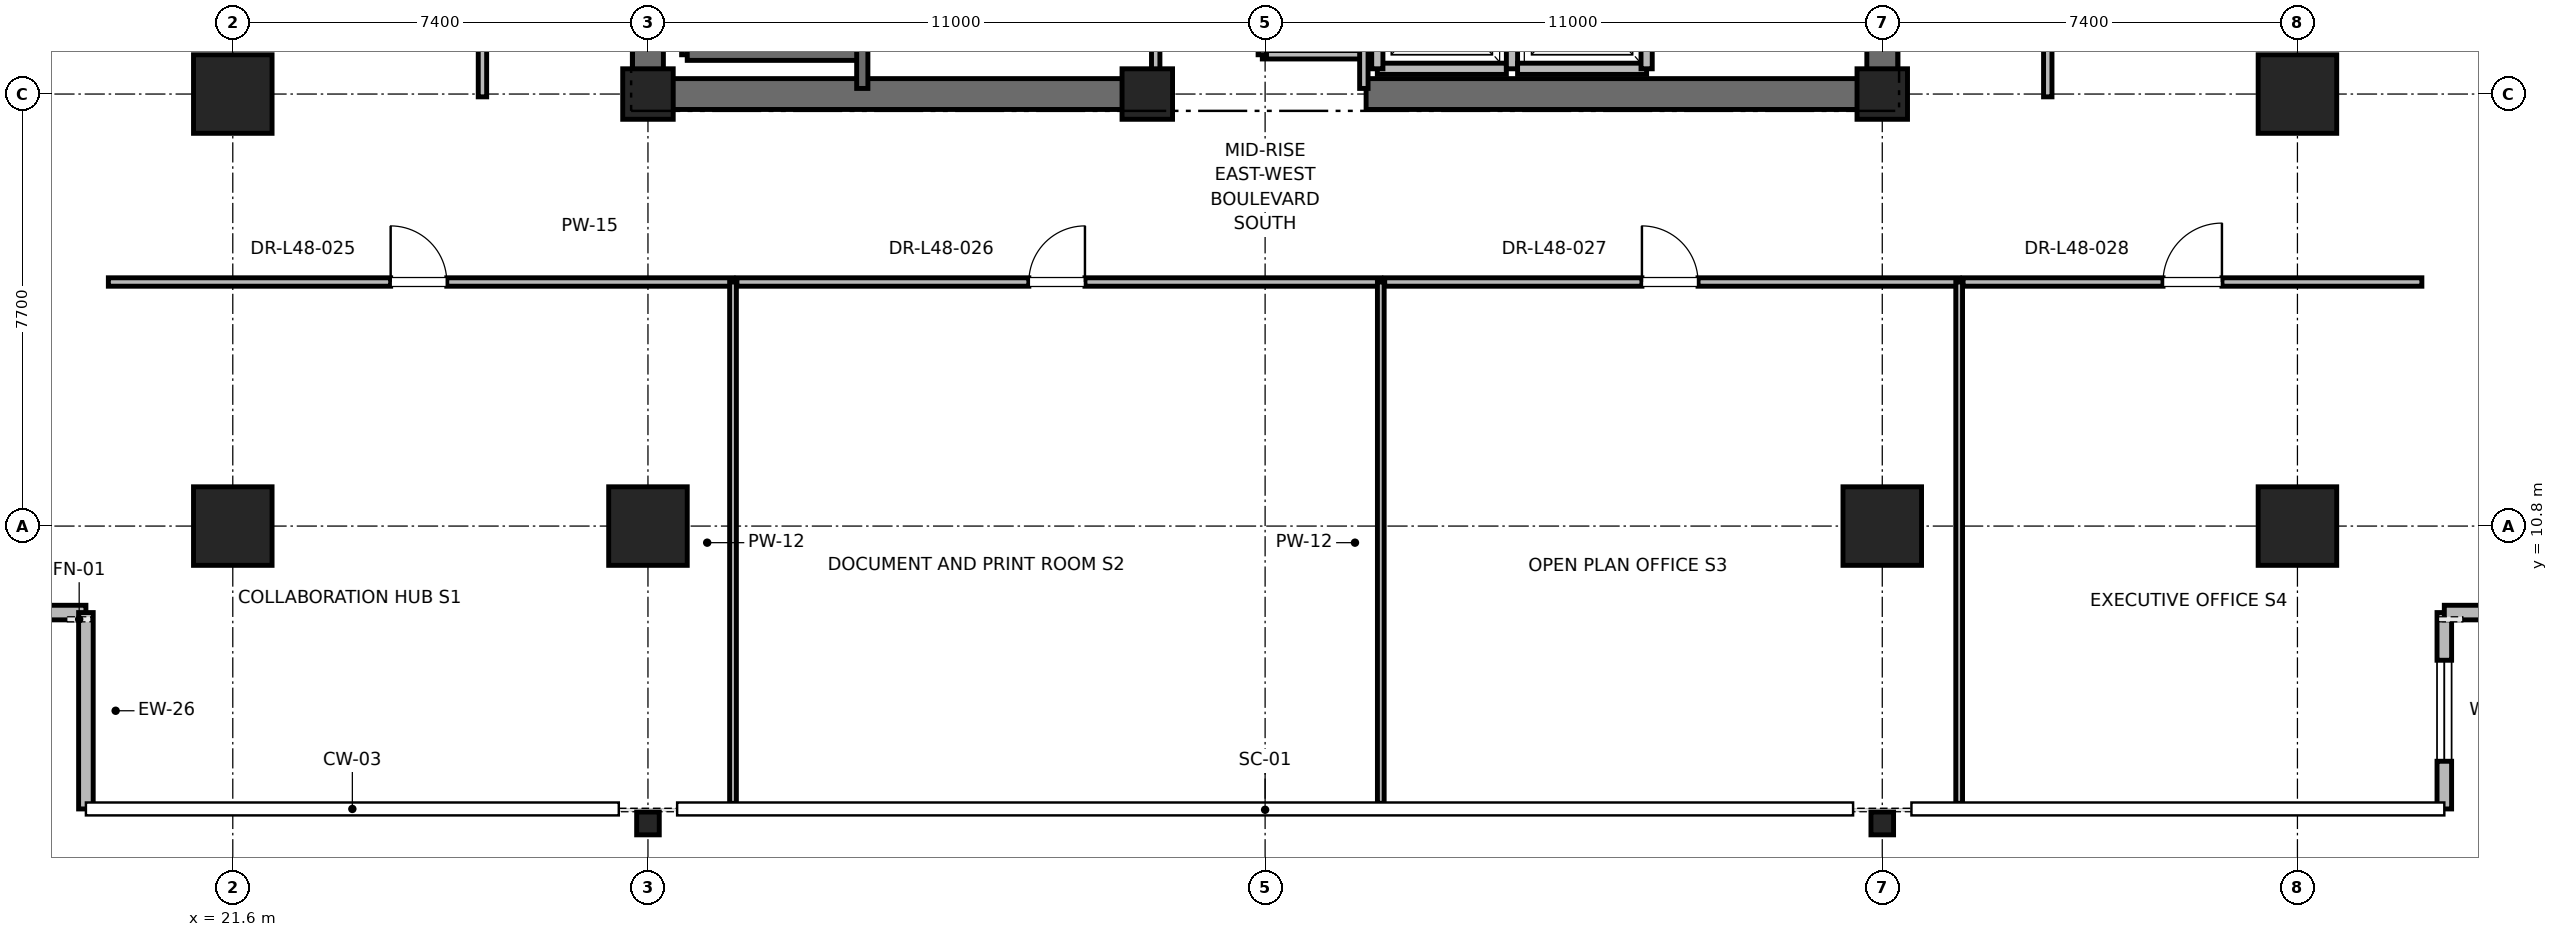
"""IFC4 building model, lengths in metres.
Left out: names, types, materials, properties, quantities, classifications, styles, units other than length and angle.
Written with IfcOpenShell. Run it as: python <this file> out.ifc"""

import sys

from ifc_helpers import new_model, si_unit, direction, frame, frame_2d, origin, origin_2d, place, context, subcontext, project, spatial, rectangle, i_section, extrude, element, fill, save


model = new_model("IFC4")
c1 = context("Model", 3, precision=1e-05, world=origin(), true_north=direction((0.0, 1.0)))
c2 = subcontext(c1, "Body", "Model", "MODEL_VIEW")
j1 = project(units=[si_unit("LENGTHUNIT", "METRE"), si_unit("PLANEANGLEUNIT", "RADIAN")], contexts=[c1])
p1 = place(None, origin())
s1 = spatial("IfcSite", under=j1, at=p1, CompositionType="ELEMENT")
p2 = place(p1, origin())
s2 = spatial("IfcBuilding", under=s1, at=p2, CompositionType="ELEMENT")
p3 = place(p2, frame((0.0, 0.0, 209.2)))
s3 = spatial("IfcBuildingStorey", under=s2, at=p3, CompositionType="ELEMENT", Elevation=209.2)
for number, where, z_axis, x_axis in (
    (1, (29.0, 10.8, 0.0), (0.0, 0.0, 1.0), (1.0, 0.0, 0.0)),
    (2, (51.0, 10.8, 0.0), (0.0, 0.0, 1.0), (1.0, 0.0, 0.0)),
    (3, (21.6, 18.5, 0.0), (0.0, 0.0, 1.0), (1.0, 0.0, 0.0)),
    (4, (58.4, 18.5, 0.0), (0.0, 0.0, 1.0), (1.0, 0.0, 0.0)),
    (5, (21.6, 10.8, 0.0), (0.0, 0.0, 1.0), (1.0, 0.0, 0.0)),
    (6, (58.4, 10.8, 0.0), (0.0, 0.0, 1.0), (1.0, 0.0, 0.0)),
):
    element("IfcColumn", number, at=place(p3, frame(where, z_axis=z_axis, x_axis=x_axis)), inside=s3, PredefinedType="COLUMN", context=c2, shape_type="SweptSolid", body=[
        extrude(rectangle(XDim=1.4, YDim=1.4, at=origin_2d()), origin(), (0.0, 0.0, 1.0), 4.0),
    ])
for number, where, z_axis, x_axis in (
    (7, (29.0, 5.5, 0.0), (0.0, 0.0, 1.0), (1.0, 0.0, 0.0)),
    (8, (51.0, 5.5, 0.0), (0.0, 0.0, 1.0), (1.0, 0.0, 0.0)),
):
    element("IfcColumn", number, at=place(p3, frame(where, z_axis=z_axis, x_axis=x_axis)), inside=s3, PredefinedType="COLUMN", context=c2, shape_type="SweptSolid", body=[
        extrude(i_section(OverallWidth=0.403, OverallDepth=0.406, WebThickness=0.027, FlangeThickness=0.043, FilletRadius=0.015, at=origin_2d()), origin(), (0.0, 0.0, 1.0), 4.0),
    ])
for number, where, z_axis, x_axis in (
    (9, (29.0, 18.5, 0.0), (0.0, 0.0, 1.0), (1.0, 0.0, 0.0)),
    (10, (51.0, 18.5, 0.0), (0.0, 0.0, 1.0), (1.0, 0.0, 0.0)),
    (11, (37.9, 18.5, 0.0), (0.0, 0.0, 1.0), (1.0, 0.0, 0.0)),
):
    element("IfcColumn", number, at=place(p3, frame(where, z_axis=z_axis, x_axis=x_axis)), inside=s3, PredefinedType="PILASTER", context=c2, shape_type="SweptSolid", body=[
        extrude(rectangle(XDim=0.9, YDim=0.9, at=origin_2d()), origin(), (0.0, 0.0, 1.0), 4.0),
    ])
for number, where, z_axis, x_axis in (
    (12, (29.0, 18.5, 0.0), (0.0, 0.0, 1.0), (1.0, 0.0, 0.0)),
    (13, (41.8, 18.5, 0.0), (0.0, 0.0, 1.0), (1.0, 0.0, 0.0)),
):
    element("IfcWall", number, at=place(p3, frame(where, z_axis=z_axis, x_axis=x_axis)), inside=s3, PredefinedType="SHEAR", context=c2, shape_type="SweptSolid", body=[
        extrude(rectangle(XDim=9.2, YDim=0.55, at=frame_2d((4.6, 0.0))), origin(), (0.0, 0.0, 1.0), 3.775),
    ])
p4 = place(p3, frame((29.0, 18.5, 0.0), z_axis=(0.0, 0.0, 1.0), x_axis=(0.0, 1.0, 0.0)))
e14 = element("IfcWall", 14, at=p4, inside=s3, PredefinedType="SHEAR", context=c2, shape_type="SweptSolid", body=[
    extrude(rectangle(XDim=8.8, YDim=0.55, at=frame_2d((4.4, 0.0))), origin(), (0.0, 0.0, 1.0), 3.775),
])
p5 = place(p3, frame((51.0, 18.5, 0.0), z_axis=(0.0, 0.0, 1.0), x_axis=(0.0, 1.0, 0.0)))
e15 = element("IfcWall", 15, at=p5, inside=s3, PredefinedType="SHEAR", context=c2, shape_type="SweptSolid", body=[
    extrude(rectangle(XDim=5.8, YDim=0.55, at=frame_2d((2.9, 0.0))), origin(), (0.0, 0.0, 1.0), 3.775),
])
p6 = place(p3, frame((14.982, 9.258, 0.0), z_axis=(0.0, 0.0, 1.0), x_axis=(1.0, 0.0, 0.0)))
e16 = element("IfcWall", 16, at=p6, inside=s3, PredefinedType="PARAPET", context=c2, shape_type="SweptSolid", body=[
    extrude(rectangle(XDim=4.0, YDim=0.26, at=frame_2d((2.0, 0.0))), origin(), (0.0, 0.0, 1.0), 3.775),
])
p7 = place(p6, frame((1.1, 0.0, 0.85)))
e17 = element("IfcOpeningElement", 17, at=p7, cuts=e16, PredefinedType="OPENING", context=c2, shape_type="SweptSolid", body=[
    extrude(rectangle(XDim=1.8, YDim=2.2, at=frame_2d((0.9, 1.1))), frame((0.0, 0.13, 0.0), z_axis=(0.0, -1.0, 0.0), x_axis=(1.0, 0.0, 0.0)), (0.0, 0.0, 1.0), 0.26),
])
p8 = place(p3, frame((18.982, 9.258, 0.0), z_axis=(0.0, 0.0, 1.0), x_axis=(0.0, -1.0, 0.0)))
e18 = element("IfcWall", 18, at=p8, inside=s3, PredefinedType="PARAPET", context=c2, shape_type="SweptSolid", body=[
    extrude(rectangle(XDim=3.5, YDim=0.26, at=frame_2d((1.75, 0.0))), origin(), (0.0, 0.0, 1.0), 3.775),
])
p9 = place(p3, frame((61.018, 5.758, 0.0), z_axis=(0.0, 0.0, 1.0), x_axis=(0.0, 1.0, 0.0)))
e19 = element("IfcWall", 19, at=p9, inside=s3, PredefinedType="PARAPET", context=c2, shape_type="SweptSolid", body=[
    extrude(rectangle(XDim=3.5, YDim=0.26, at=frame_2d((1.75, 0.0))), origin(), (0.0, 0.0, 1.0), 3.775),
])
p10 = place(p9, frame((0.85, 0.0, 0.85)))
e20 = element("IfcOpeningElement", 20, at=p10, cuts=e19, PredefinedType="OPENING", context=c2, shape_type="SweptSolid", body=[
    extrude(rectangle(XDim=1.8, YDim=2.2, at=frame_2d((0.9, 1.1))), frame((0.0, 0.13, 0.0), z_axis=(0.0, -1.0, 0.0), x_axis=(1.0, 0.0, 0.0)), (0.0, 0.0, 1.0), 0.26),
])
p11 = place(p3, frame((61.018, 9.258, 0.0), z_axis=(0.0, 0.0, 1.0), x_axis=(1.0, 0.0, 0.0)))
e21 = element("IfcWall", 21, at=p11, inside=s3, PredefinedType="PARAPET", context=c2, shape_type="SweptSolid", body=[
    extrude(rectangle(XDim=4.0, YDim=0.26, at=frame_2d((2.0, 0.0))), origin(), (0.0, 0.0, 1.0), 3.775),
])
p12 = place(p3, frame((29.7, 19.2, 0.0), z_axis=(0.0, 0.0, 1.0), x_axis=(0.0, 1.0, 0.0)))
e22 = element("IfcWall", 22, at=p12, inside=s3, PredefinedType="SOLIDWALL", context=c2, shape_type="SweptSolid", body=[
    extrude(rectangle(XDim=8.15, YDim=0.2, at=frame_2d((4.075, 0.0))), origin(), (0.0, 0.0, 1.0), 3.775),
])
p13 = place(p3, frame((29.7, 19.2, 0.0), z_axis=(0.0, 0.0, 1.0), x_axis=(1.0, 0.0, 0.0)))
e23 = element("IfcWall", 23, at=p13, inside=s3, PredefinedType="SOLIDWALL", context=c2, shape_type="SweptSolid", body=[
    extrude(rectangle(XDim=3.12, YDim=0.2, at=frame_2d((1.56, 0.0))), origin(), (0.0, 0.0, 1.0), 3.775),
])
p14 = place(p3, frame((32.82, 18.6, 0.0), z_axis=(0.0, 0.0, 1.0), x_axis=(0.0, 1.0, 0.0)))
e24 = element("IfcWall", 24, at=p14, inside=s3, PredefinedType="SOLIDWALL", context=c2, shape_type="SweptSolid", body=[
    extrude(rectangle(XDim=8.78, YDim=0.2, at=frame_2d((4.39, 0.0))), origin(), (0.0, 0.0, 1.0), 3.775),
])
p15 = place(p3, frame((42.0, 18.95, 0.0), z_axis=(0.0, 0.0, 1.0), x_axis=(1.0, 0.0, 0.0)))
e25 = element("IfcWall", 25, at=p15, inside=s3, PredefinedType="SOLIDWALL", context=c2, shape_type="SweptSolid", body=[
    extrude(rectangle(XDim=2.3, YDim=0.2, at=frame_2d((1.15, 0.0))), origin(), (0.0, 0.0, 1.0), 2.755),
])
p16 = place(p3, frame((42.0, 21.55, 0.0), z_axis=(0.0, 0.0, 1.0), x_axis=(0.0, -1.0, 0.0)))
e26 = element("IfcWall", 26, at=p16, inside=s3, PredefinedType="SOLIDWALL", context=c2, shape_type="SweptSolid", body=[
    extrude(rectangle(XDim=2.6, YDim=0.2, at=frame_2d((1.3, 0.0))), origin(), (0.0, 0.0, 1.0), 2.755),
])
p17 = place(p3, frame((44.4, 18.95, 0.0), z_axis=(0.0, 0.0, 1.0), x_axis=(0.0, 1.0, 0.0)))
e27 = element("IfcWall", 27, at=p17, inside=s3, PredefinedType="SOLIDWALL", context=c2, shape_type="SweptSolid", body=[
    extrude(rectangle(XDim=2.6, YDim=0.2, at=frame_2d((1.3, 0.0))), origin(), (0.0, 0.0, 1.0), 3.775),
])
p18 = place(p3, frame((44.5, 18.95, 0.0), z_axis=(0.0, 0.0, 1.0), x_axis=(1.0, 0.0, 0.0)))
e28 = element("IfcWall", 28, at=p18, inside=s3, PredefinedType="SOLIDWALL", context=c2, shape_type="SweptSolid", body=[
    extrude(rectangle(XDim=2.3, YDim=0.2, at=frame_2d((1.15, 0.0))), origin(), (0.0, 0.0, 1.0), 3.775),
])
p19 = place(p3, frame((46.8, 18.95, 0.0), z_axis=(0.0, 0.0, 1.0), x_axis=(0.0, 1.0, 0.0)))
e29 = element("IfcWall", 29, at=p19, inside=s3, PredefinedType="SOLIDWALL", context=c2, shape_type="SweptSolid", body=[
    extrude(rectangle(XDim=2.6, YDim=0.2, at=frame_2d((1.3, 0.0))), origin(), (0.0, 0.0, 1.0), 3.775),
])
p20 = place(p3, frame((39.95, 19.2, 0.0), z_axis=(0.0, 0.0, 1.0), x_axis=(1.0, 0.0, 0.0)))
e30 = element("IfcWall", 30, at=p20, inside=s3, PredefinedType="PARTITIONING", context=c2, shape_type="SweptSolid", body=[
    extrude(rectangle(XDim=1.81, YDim=0.15, at=frame_2d((0.905, 0.0))), origin(), (0.0, 0.0, 1.0), 2.85),
])
p21 = place(p3, frame((41.76, 18.6, 0.0), z_axis=(0.0, 0.0, 1.0), x_axis=(0.0, 1.0, 0.0)))
e31 = element("IfcWall", 31, at=p21, inside=s3, PredefinedType="PARTITIONING", context=c2, shape_type="SweptSolid", body=[
    extrude(rectangle(XDim=3.6, YDim=0.15, at=frame_2d((1.8, 0.0))), origin(), (0.0, 0.0, 1.0), 2.755),
])
p22 = place(p3, frame((39.95, 19.2, 0.0), z_axis=(0.0, 0.0, 1.0), x_axis=(0.0, 1.0, 0.0)))
e32 = element("IfcWall", 32, at=p22, inside=s3, PredefinedType="PARTITIONING", context=c2, shape_type="SweptSolid", body=[
    extrude(rectangle(XDim=3.0, YDim=0.15, at=frame_2d((1.5, 0.0))), origin(), (0.0, 0.0, 1.0), 2.85),
])
p23 = place(p22, frame((1.05, 0.0, 0.0)))
e33 = element("IfcOpeningElement", 33, at=p23, cuts=e32, PredefinedType="OPENING", context=c2, shape_type="SweptSolid", body=[
    extrude(rectangle(XDim=0.9, YDim=2.1, at=frame_2d((0.45, 1.05))), frame((0.0, 0.075, 0.0), z_axis=(0.0, -1.0, 0.0), x_axis=(1.0, 0.0, 0.0)), (0.0, 0.0, 1.0), 0.15),
])
p24 = place(p3, frame((38.05, 18.6, 0.0), z_axis=(0.0, 0.0, 1.0), x_axis=(0.0, 1.0, 0.0)))
e34 = element("IfcWall", 34, at=p24, inside=s3, PredefinedType="PARTITIONING", context=c2, shape_type="SweptSolid", body=[
    extrude(rectangle(XDim=3.06, YDim=0.15, at=frame_2d((1.53, 0.0))), origin(), (0.0, 0.0, 1.0), 2.755),
])
p25 = place(p24, frame((1.03, 0.0, 0.0)))
e35 = element("IfcOpeningElement", 35, at=p25, cuts=e34, PredefinedType="OPENING", context=c2, shape_type="SweptSolid", body=[
    extrude(rectangle(XDim=1.0, YDim=2.15, at=frame_2d((0.5, 1.075))), frame((0.0, 0.075, 0.0), z_axis=(0.0, -1.0, 0.0), x_axis=(1.0, 0.0, 0.0)), (0.0, 0.0, 1.0), 0.15),
])
p26 = place(p3, frame((19.382, 15.15, 0.0), z_axis=(0.0, 0.0, 1.0), x_axis=(1.0, 0.0, 0.0)))
e36 = element("IfcWall", 36, at=p26, inside=s3, PredefinedType="PARTITIONING", context=c2, shape_type="SweptSolid", body=[
    extrude(rectangle(XDim=11.134, YDim=0.15, at=frame_2d((5.567, 0.0))), origin(), (0.0, 0.0, 1.0), 2.85),
])
p27 = place(p26, frame((5.032, 0.0, 0.0)))
e37 = element("IfcOpeningElement", 37, at=p27, cuts=e36, PredefinedType="OPENING", context=c2, shape_type="SweptSolid", body=[
    extrude(rectangle(XDim=1.0, YDim=2.15, at=frame_2d((0.5, 1.075))), frame((0.0, 0.075, 0.0), z_axis=(0.0, -1.0, 0.0), x_axis=(1.0, 0.0, 0.0)), (0.0, 0.0, 1.0), 0.15),
])
p28 = place(p3, frame((30.516, 5.858, 0.0), z_axis=(0.0, 0.0, 1.0), x_axis=(0.0, 1.0, 0.0)))
e38 = element("IfcWall", 38, at=p28, inside=s3, PredefinedType="PARTITIONING", context=c2, shape_type="SweptSolid", body=[
    extrude(rectangle(XDim=9.292, YDim=0.12, at=frame_2d((4.646, 0.0))), origin(), (0.0, 0.0, 1.0), 2.405),
])
p29 = place(p3, frame((30.586, 15.15, 0.0), z_axis=(0.0, 0.0, 1.0), x_axis=(1.0, 0.0, 0.0)))
e39 = element("IfcWall", 39, at=p29, inside=s3, PredefinedType="PARTITIONING", context=c2, shape_type="SweptSolid", body=[
    extrude(rectangle(XDim=11.476, YDim=0.15, at=frame_2d((5.738, 0.0))), origin(), (0.0, 0.0, 1.0), 2.85),
])
p30 = place(p29, frame((5.203, 0.0, 0.0)))
e40 = element("IfcOpeningElement", 40, at=p30, cuts=e39, PredefinedType="OPENING", context=c2, shape_type="SweptSolid", body=[
    extrude(rectangle(XDim=1.0, YDim=2.15, at=frame_2d((0.5, 1.075))), frame((0.0, 0.075, 0.0), z_axis=(0.0, -1.0, 0.0), x_axis=(1.0, 0.0, 0.0)), (0.0, 0.0, 1.0), 0.15),
])
p31 = place(p3, frame((42.062, 5.858, 0.0), z_axis=(0.0, 0.0, 1.0), x_axis=(0.0, 1.0, 0.0)))
e41 = element("IfcWall", 41, at=p31, inside=s3, PredefinedType="PARTITIONING", context=c2, shape_type="SweptSolid", body=[
    extrude(rectangle(XDim=9.292, YDim=0.12, at=frame_2d((4.646, 0.0))), origin(), (0.0, 0.0, 1.0), 2.405),
])
p32 = place(p3, frame((42.132, 15.15, 0.0), z_axis=(0.0, 0.0, 1.0), x_axis=(1.0, 0.0, 0.0)))
e42 = element("IfcWall", 42, at=p32, inside=s3, PredefinedType="PARTITIONING", context=c2, shape_type="SweptSolid", body=[
    extrude(rectangle(XDim=10.239, YDim=0.15, at=frame_2d((5.119, 0.0))), origin(), (0.0, 0.0, 1.0), 2.85),
])
p33 = place(p32, frame((4.584, 0.0, 0.0)))
e43 = element("IfcOpeningElement", 43, at=p33, cuts=e42, PredefinedType="OPENING", context=c2, shape_type="SweptSolid", body=[
    extrude(rectangle(XDim=1.0, YDim=2.15, at=frame_2d((0.5, 1.075))), frame((0.0, 0.075, 0.0), z_axis=(0.0, -1.0, 0.0), x_axis=(1.0, 0.0, 0.0)), (0.0, 0.0, 1.0), 0.15),
])
p34 = place(p3, frame((52.371, 5.858, 0.0), z_axis=(0.0, 0.0, 1.0), x_axis=(0.0, 1.0, 0.0)))
e44 = element("IfcWall", 44, at=p34, inside=s3, PredefinedType="PARTITIONING", context=c2, shape_type="SweptSolid", body=[
    extrude(rectangle(XDim=9.292, YDim=0.12, at=frame_2d((4.646, 0.0))), origin(), (0.0, 0.0, 1.0), 2.85),
])
p35 = place(p3, frame((52.441, 15.15, 0.0), z_axis=(0.0, 0.0, 1.0), x_axis=(1.0, 0.0, 0.0)))
e45 = element("IfcWall", 45, at=p35, inside=s3, PredefinedType="PARTITIONING", context=c2, shape_type="SweptSolid", body=[
    extrude(rectangle(XDim=8.177, YDim=0.15, at=frame_2d((4.089, 0.0))), origin(), (0.0, 0.0, 1.0), 2.85),
])
p36 = place(p35, frame((3.564, 0.0, 0.0)))
e46 = element("IfcOpeningElement", 46, at=p36, cuts=e45, PredefinedType="OPENING", context=c2, shape_type="SweptSolid", body=[
    extrude(rectangle(XDim=1.05, YDim=2.2, at=frame_2d((0.525, 1.1))), frame((0.0, 0.075, 0.0), z_axis=(0.0, -1.0, 0.0), x_axis=(1.0, 0.0, 0.0)), (0.0, 0.0, 1.0), 0.15),
])
p37 = place(p3, frame((26.05, 18.45, 0.0), z_axis=(0.0, 0.0, 1.0), x_axis=(0.0, 1.0, 0.0)))
e47 = element("IfcWall", 47, at=p37, inside=s3, PredefinedType="PARTITIONING", context=c2, shape_type="SweptSolid", body=[
    extrude(rectangle(XDim=7.602, YDim=0.15, at=frame_2d((3.801, 0.0))), origin(), (0.0, 0.0, 1.0), 2.85),
])
p38 = place(p37, frame((3.091, 0.0, 0.0)))
e48 = element("IfcOpeningElement", 48, at=p38, cuts=e47, PredefinedType="OPENING", context=c2, shape_type="SweptSolid", body=[
    extrude(rectangle(XDim=1.5, YDim=2.25, at=frame_2d((0.75, 1.125))), frame((0.0, 0.075, 0.0), z_axis=(0.0, -1.0, 0.0), x_axis=(1.0, 0.0, 0.0)), (0.0, 0.0, 1.0), 0.15),
])
p39 = place(p3, frame((53.95, 18.45, 0.0), z_axis=(0.0, 0.0, 1.0), x_axis=(0.0, 1.0, 0.0)))
e49 = element("IfcWall", 49, at=p39, inside=s3, PredefinedType="PARTITIONING", context=c2, shape_type="SweptSolid", body=[
    extrude(rectangle(XDim=10.498, YDim=0.15, at=frame_2d((5.249, 0.0))), origin(), (0.0, 0.0, 1.0), 2.85),
])
p40 = place(p39, frame((4.789, 0.0, 0.0)))
e50 = element("IfcOpeningElement", 50, at=p40, cuts=e49, PredefinedType="OPENING", context=c2, shape_type="SweptSolid", body=[
    extrude(rectangle(XDim=1.0, YDim=2.15, at=frame_2d((0.5, 1.075))), frame((0.0, 0.075, 0.0), z_axis=(0.0, -1.0, 0.0), x_axis=(1.0, 0.0, 0.0)), (0.0, 0.0, 1.0), 0.15),
])
p41 = place(p10, origin())
e51 = element("IfcWindow", 51, at=p41, inside=s3, PartitioningType="SINGLE_PANEL", PredefinedType="WINDOW", context=c2, shape_type="SweptSolid", body=[
    extrude(rectangle(XDim=1.8, YDim=2.2, at=frame_2d((0.9, 1.1))), frame((0.0, 0.03, 0.0), z_axis=(0.0, -1.0, 0.0), x_axis=(1.0, 0.0, 0.0)), (0.0, 0.0, 1.0), 0.06),
])
fill(e20, e51)
p42 = place(p27, origin())
e52 = element("IfcDoor", 52, at=p42, inside=s3, OperationType="SINGLE_SWING_LEFT", PredefinedType="DOOR", context=c2, shape_type="SweptSolid", body=[
    extrude(rectangle(XDim=1.0, YDim=2.15, at=frame_2d((0.5, 1.075))), frame((0.0, 0.025, 0.0), z_axis=(0.0, -1.0, 0.0), x_axis=(1.0, 0.0, 0.0)), (0.0, 0.0, 1.0), 0.05),
])
fill(e37, e52)
p43 = place(p30, origin())
e53 = element("IfcDoor", 53, at=p43, inside=s3, OperationType="SINGLE_SWING_RIGHT", PredefinedType="DOOR", context=c2, shape_type="SweptSolid", body=[
    extrude(rectangle(XDim=1.0, YDim=2.15, at=frame_2d((0.5, 1.075))), frame((0.0, 0.025, 0.0), z_axis=(0.0, -1.0, 0.0), x_axis=(1.0, 0.0, 0.0)), (0.0, 0.0, 1.0), 0.05),
])
fill(e40, e53)
p44 = place(p33, origin())
e54 = element("IfcDoor", 54, at=p44, inside=s3, OperationType="SINGLE_SWING_LEFT", PredefinedType="DOOR", context=c2, shape_type="SweptSolid", body=[
    extrude(rectangle(XDim=1.0, YDim=2.15, at=frame_2d((0.5, 1.075))), frame((0.0, 0.025, 0.0), z_axis=(0.0, -1.0, 0.0), x_axis=(1.0, 0.0, 0.0)), (0.0, 0.0, 1.0), 0.05),
])
fill(e43, e54)
p45 = place(p36, origin())
e55 = element("IfcDoor", 55, at=p45, inside=s3, OperationType="SINGLE_SWING_RIGHT", PredefinedType="DOOR", context=c2, shape_type="SweptSolid", body=[
    extrude(rectangle(XDim=1.05, YDim=2.2, at=frame_2d((0.525, 1.1))), frame((0.0, 0.025, 0.0), z_axis=(0.0, -1.0, 0.0), x_axis=(1.0, 0.0, 0.0)), (0.0, 0.0, 1.0), 0.05),
])
fill(e46, e55)
save(model, sys.argv[1])
